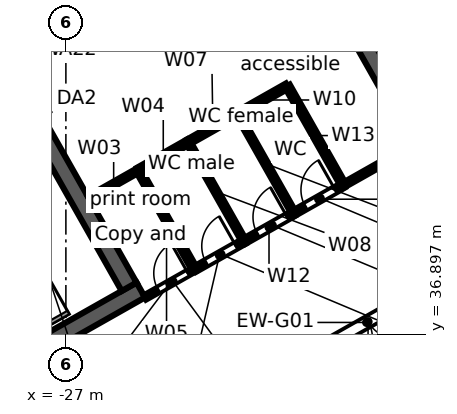
"""IFC4 building model, lengths in metres.
Left out: names, types, materials, properties, quantities, classifications, styles, units other than length and angle.
Written with IfcOpenShell. Run it as: python <this file> out.ifc"""

import sys

from ifc_helpers import new_model, si_unit, direction, frame, frame_2d, origin, place, context, subcontext, project, spatial, rectangle, extrude, element, fill, save


model = new_model("IFC4")
c1 = context("Model", 3, precision=1e-05, world=origin(), true_north=direction((0.0, 1.0)))
c2 = subcontext(c1, "Body", "Model", "MODEL_VIEW")
j1 = project(units=[si_unit("LENGTHUNIT", "METRE"), si_unit("PLANEANGLEUNIT", "RADIAN")], contexts=[c1])
p1 = place(None, origin())
s1 = spatial("IfcSite", under=j1, at=p1, CompositionType="ELEMENT")
p2 = place(p1, origin())
s2 = spatial("IfcBuilding", under=s1, at=p2, CompositionType="ELEMENT")
p3 = place(p2, frame((0.0, 0.0, 250.4)))
s3 = spatial("IfcBuildingStorey", under=s2, at=p3, CompositionType="ELEMENT", Elevation=250.4)
p4 = place(p3, frame((-0.046, 47.974, 0.0), z_axis=(0.0, 0.0, 1.0), x_axis=(-0.870356579543, -0.492421998337, 0.0)))
e1 = element("IfcWall", 1, at=p4, inside=s3, PredefinedType="STANDARD", context=c2, shape_type="SweptSolid", body=[
    extrude(rectangle(XDim=43.754, YDim=0.25, at=frame_2d((21.877, 0.0))), origin(), (0.0, 0.0, 1.0), 3.62),
])
p5 = place(p4, frame((41.061, 0.0, 0.8)))
e2 = element("IfcOpeningElement", 2, at=p5, cuts=e1, PredefinedType="OPENING", context=c2, shape_type="SweptSolid", body=[
    extrude(rectangle(XDim=2.4, YDim=2.2, at=frame_2d((1.2, 1.1))), frame((0.0, 0.135, 0.0), z_axis=(0.0, -1.0, 0.0), x_axis=(1.0, 0.0, 0.0)), (0.0, 0.0, 1.0), 0.27),
])
p6 = place(p4, frame((38.443, 0.0, 0.0)))
e3 = element("IfcOpeningElement", 3, at=p6, cuts=e1, PredefinedType="OPENING", context=c2, shape_type="SweptSolid", body=[
    extrude(rectangle(XDim=1.8, YDim=2.4, at=frame_2d((0.9, 1.2))), frame((0.0, 0.135, 0.0), z_axis=(0.0, -1.0, 0.0), x_axis=(1.0, 0.0, 0.0)), (0.0, 0.0, 1.0), 0.27),
])
p7 = place(p4, frame((35.225, 0.0, 0.8)))
e4 = element("IfcOpeningElement", 4, at=p7, cuts=e1, PredefinedType="OPENING", context=c2, shape_type="SweptSolid", body=[
    extrude(rectangle(XDim=2.4, YDim=2.2, at=frame_2d((1.2, 1.1))), frame((0.0, 0.135, 0.0), z_axis=(0.0, -1.0, 0.0), x_axis=(1.0, 0.0, 0.0)), (0.0, 0.0, 1.0), 0.27),
])
p8 = place(p4, frame((32.307, 0.0, 0.8)))
e5 = element("IfcOpeningElement", 5, at=p8, cuts=e1, PredefinedType="OPENING", context=c2, shape_type="SweptSolid", body=[
    extrude(rectangle(XDim=2.4, YDim=2.2, at=frame_2d((1.2, 1.1))), frame((0.0, 0.135, 0.0), z_axis=(0.0, -1.0, 0.0), x_axis=(1.0, 0.0, 0.0)), (0.0, 0.0, 1.0), 0.27),
])
p9 = place(p4, frame((29.688, 0.0, 0.0)))
e6 = element("IfcOpeningElement", 6, at=p9, cuts=e1, PredefinedType="OPENING", context=c2, shape_type="SweptSolid", body=[
    extrude(rectangle(XDim=1.8, YDim=2.4, at=frame_2d((0.9, 1.2))), frame((0.0, 0.135, 0.0), z_axis=(0.0, -1.0, 0.0), x_axis=(1.0, 0.0, 0.0)), (0.0, 0.0, 1.0), 0.27),
])
p10 = place(p4, frame((26.47, 0.0, 0.8)))
e7 = element("IfcOpeningElement", 7, at=p10, cuts=e1, PredefinedType="OPENING", context=c2, shape_type="SweptSolid", body=[
    extrude(rectangle(XDim=2.4, YDim=2.2, at=frame_2d((1.2, 1.1))), frame((0.0, 0.135, 0.0), z_axis=(0.0, -1.0, 0.0), x_axis=(1.0, 0.0, 0.0)), (0.0, 0.0, 1.0), 0.27),
])
p11 = place(p4, frame((23.552, 0.0, 0.8)))
e8 = element("IfcOpeningElement", 8, at=p11, cuts=e1, PredefinedType="OPENING", context=c2, shape_type="SweptSolid", body=[
    extrude(rectangle(XDim=2.4, YDim=2.2, at=frame_2d((1.2, 1.1))), frame((0.0, 0.135, 0.0), z_axis=(0.0, -1.0, 0.0), x_axis=(1.0, 0.0, 0.0)), (0.0, 0.0, 1.0), 0.27),
])
p12 = place(p4, frame((20.934, 0.0, 0.0)))
e9 = element("IfcOpeningElement", 9, at=p12, cuts=e1, PredefinedType="OPENING", context=c2, shape_type="SweptSolid", body=[
    extrude(rectangle(XDim=1.8, YDim=2.4, at=frame_2d((0.9, 1.2))), frame((0.0, 0.135, 0.0), z_axis=(0.0, -1.0, 0.0), x_axis=(1.0, 0.0, 0.0)), (0.0, 0.0, 1.0), 0.27),
])
p13 = place(p4, frame((17.716, 0.0, 0.8)))
e10 = element("IfcOpeningElement", 10, at=p13, cuts=e1, PredefinedType="OPENING", context=c2, shape_type="SweptSolid", body=[
    extrude(rectangle(XDim=2.4, YDim=2.2, at=frame_2d((1.2, 1.1))), frame((0.0, 0.135, 0.0), z_axis=(0.0, -1.0, 0.0), x_axis=(1.0, 0.0, 0.0)), (0.0, 0.0, 1.0), 0.27),
])
p14 = place(p4, frame((14.798, 0.0, 0.8)))
e11 = element("IfcOpeningElement", 11, at=p14, cuts=e1, PredefinedType="OPENING", context=c2, shape_type="SweptSolid", body=[
    extrude(rectangle(XDim=2.4, YDim=2.2, at=frame_2d((1.2, 1.1))), frame((0.0, 0.135, 0.0), z_axis=(0.0, -1.0, 0.0), x_axis=(1.0, 0.0, 0.0)), (0.0, 0.0, 1.0), 0.27),
])
p15 = place(p4, frame((12.179, 0.0, 0.0)))
e12 = element("IfcOpeningElement", 12, at=p15, cuts=e1, PredefinedType="OPENING", context=c2, shape_type="SweptSolid", body=[
    extrude(rectangle(XDim=1.8, YDim=2.4, at=frame_2d((0.9, 1.2))), frame((0.0, 0.135, 0.0), z_axis=(0.0, -1.0, 0.0), x_axis=(1.0, 0.0, 0.0)), (0.0, 0.0, 1.0), 0.27),
])
p16 = place(p4, frame((8.961, 0.0, 0.8)))
e13 = element("IfcOpeningElement", 13, at=p16, cuts=e1, PredefinedType="OPENING", context=c2, shape_type="SweptSolid", body=[
    extrude(rectangle(XDim=2.4, YDim=2.2, at=frame_2d((1.2, 1.1))), frame((0.0, 0.135, 0.0), z_axis=(0.0, -1.0, 0.0), x_axis=(1.0, 0.0, 0.0)), (0.0, 0.0, 1.0), 0.27),
])
p17 = place(p4, frame((6.043, 0.0, 0.8)))
e14 = element("IfcOpeningElement", 14, at=p17, cuts=e1, PredefinedType="OPENING", context=c2, shape_type="SweptSolid", body=[
    extrude(rectangle(XDim=2.4, YDim=2.2, at=frame_2d((1.2, 1.1))), frame((0.0, 0.135, 0.0), z_axis=(0.0, -1.0, 0.0), x_axis=(1.0, 0.0, 0.0)), (0.0, 0.0, 1.0), 0.27),
])
p18 = place(p4, frame((3.425, 0.0, 0.0)))
e15 = element("IfcOpeningElement", 15, at=p18, cuts=e1, PredefinedType="OPENING", context=c2, shape_type="SweptSolid", body=[
    extrude(rectangle(XDim=1.8, YDim=2.4, at=frame_2d((0.9, 1.2))), frame((0.0, 0.135, 0.0), z_axis=(0.0, -1.0, 0.0), x_axis=(1.0, 0.0, 0.0)), (0.0, 0.0, 1.0), 0.27),
])
p19 = place(p4, frame((0.207, 0.0, 0.8)))
e16 = element("IfcOpeningElement", 16, at=p19, cuts=e1, PredefinedType="OPENING", context=c2, shape_type="SweptSolid", body=[
    extrude(rectangle(XDim=2.4, YDim=2.2, at=frame_2d((1.2, 1.1))), frame((0.0, 0.135, 0.0), z_axis=(0.0, -1.0, 0.0), x_axis=(1.0, 0.0, 0.0)), (0.0, 0.0, 1.0), 0.27),
])
p20 = place(p3, frame((-58.732, 38.771, 0.0), z_axis=(0.0, 0.0, 1.0), x_axis=(0.870354824205, 0.492425100887, 0.0)))
e17 = element("IfcWall", 17, at=p20, inside=s3, PredefinedType="STANDARD", context=c2, shape_type="SweptSolid", body=[
    extrude(rectangle(XDim=64.006, YDim=0.25, at=frame_2d((32.003, 0.0))), origin(), (0.0, 0.0, 1.0), 3.62),
])
p21 = place(p20, frame((61.259, 0.0, 0.8)))
e18 = element("IfcOpeningElement", 18, at=p21, cuts=e17, PredefinedType="OPENING", context=c2, shape_type="SweptSolid", body=[
    extrude(rectangle(XDim=2.4, YDim=2.2, at=frame_2d((1.2, 1.1))), frame((0.0, 0.135, 0.0), z_axis=(0.0, -1.0, 0.0), x_axis=(1.0, 0.0, 0.0)), (0.0, 0.0, 1.0), 0.27),
])
p22 = place(p20, frame((58.216, 0.0, 0.8)))
e19 = element("IfcOpeningElement", 19, at=p22, cuts=e17, PredefinedType="OPENING", context=c2, shape_type="SweptSolid", body=[
    extrude(rectangle(XDim=2.4, YDim=2.2, at=frame_2d((1.2, 1.1))), frame((0.0, 0.135, 0.0), z_axis=(0.0, -1.0, 0.0), x_axis=(1.0, 0.0, 0.0)), (0.0, 0.0, 1.0), 0.27),
])
p23 = place(p20, frame((55.173, 0.0, 0.8)))
e20 = element("IfcOpeningElement", 20, at=p23, cuts=e17, PredefinedType="OPENING", context=c2, shape_type="SweptSolid", body=[
    extrude(rectangle(XDim=2.4, YDim=2.2, at=frame_2d((1.2, 1.1))), frame((0.0, 0.135, 0.0), z_axis=(0.0, -1.0, 0.0), x_axis=(1.0, 0.0, 0.0)), (0.0, 0.0, 1.0), 0.27),
])
p24 = place(p20, frame((52.129, 0.0, 0.8)))
e21 = element("IfcOpeningElement", 21, at=p24, cuts=e17, PredefinedType="OPENING", context=c2, shape_type="SweptSolid", body=[
    extrude(rectangle(XDim=2.4, YDim=2.2, at=frame_2d((1.2, 1.1))), frame((0.0, 0.135, 0.0), z_axis=(0.0, -1.0, 0.0), x_axis=(1.0, 0.0, 0.0)), (0.0, 0.0, 1.0), 0.27),
])
p25 = place(p20, frame((49.086, 0.0, 0.8)))
e22 = element("IfcOpeningElement", 22, at=p25, cuts=e17, PredefinedType="OPENING", context=c2, shape_type="SweptSolid", body=[
    extrude(rectangle(XDim=2.4, YDim=2.2, at=frame_2d((1.2, 1.1))), frame((0.0, 0.135, 0.0), z_axis=(0.0, -1.0, 0.0), x_axis=(1.0, 0.0, 0.0)), (0.0, 0.0, 1.0), 0.27),
])
p26 = place(p20, frame((46.043, 0.0, 0.8)))
e23 = element("IfcOpeningElement", 23, at=p26, cuts=e17, PredefinedType="OPENING", context=c2, shape_type="SweptSolid", body=[
    extrude(rectangle(XDim=2.4, YDim=2.2, at=frame_2d((1.2, 1.1))), frame((0.0, 0.135, 0.0), z_axis=(0.0, -1.0, 0.0), x_axis=(1.0, 0.0, 0.0)), (0.0, 0.0, 1.0), 0.27),
])
p27 = place(p20, frame((43.0, 0.0, 0.8)))
e24 = element("IfcOpeningElement", 24, at=p27, cuts=e17, PredefinedType="OPENING", context=c2, shape_type="SweptSolid", body=[
    extrude(rectangle(XDim=2.4, YDim=2.2, at=frame_2d((1.2, 1.1))), frame((0.0, 0.135, 0.0), z_axis=(0.0, -1.0, 0.0), x_axis=(1.0, 0.0, 0.0)), (0.0, 0.0, 1.0), 0.27),
])
p28 = place(p20, frame((39.956, 0.0, 0.8)))
e25 = element("IfcOpeningElement", 25, at=p28, cuts=e17, PredefinedType="OPENING", context=c2, shape_type="SweptSolid", body=[
    extrude(rectangle(XDim=2.4, YDim=2.2, at=frame_2d((1.2, 1.1))), frame((0.0, 0.135, 0.0), z_axis=(0.0, -1.0, 0.0), x_axis=(1.0, 0.0, 0.0)), (0.0, 0.0, 1.0), 0.27),
])
p29 = place(p20, frame((36.913, 0.0, 0.8)))
e26 = element("IfcOpeningElement", 26, at=p29, cuts=e17, PredefinedType="OPENING", context=c2, shape_type="SweptSolid", body=[
    extrude(rectangle(XDim=2.4, YDim=2.2, at=frame_2d((1.2, 1.1))), frame((0.0, 0.135, 0.0), z_axis=(0.0, -1.0, 0.0), x_axis=(1.0, 0.0, 0.0)), (0.0, 0.0, 1.0), 0.27),
])
p30 = place(p20, frame((33.87, 0.0, 0.8)))
e27 = element("IfcOpeningElement", 27, at=p30, cuts=e17, PredefinedType="OPENING", context=c2, shape_type="SweptSolid", body=[
    extrude(rectangle(XDim=2.4, YDim=2.2, at=frame_2d((1.2, 1.1))), frame((0.0, 0.135, 0.0), z_axis=(0.0, -1.0, 0.0), x_axis=(1.0, 0.0, 0.0)), (0.0, 0.0, 1.0), 0.27),
])
p31 = place(p20, frame((30.826, 0.0, 0.8)))
e28 = element("IfcOpeningElement", 28, at=p31, cuts=e17, PredefinedType="OPENING", context=c2, shape_type="SweptSolid", body=[
    extrude(rectangle(XDim=2.4, YDim=2.2, at=frame_2d((1.2, 1.1))), frame((0.0, 0.135, 0.0), z_axis=(0.0, -1.0, 0.0), x_axis=(1.0, 0.0, 0.0)), (0.0, 0.0, 1.0), 0.27),
])
p32 = place(p20, frame((27.783, 0.0, 0.8)))
e29 = element("IfcOpeningElement", 29, at=p32, cuts=e17, PredefinedType="OPENING", context=c2, shape_type="SweptSolid", body=[
    extrude(rectangle(XDim=2.4, YDim=2.2, at=frame_2d((1.2, 1.1))), frame((0.0, 0.135, 0.0), z_axis=(0.0, -1.0, 0.0), x_axis=(1.0, 0.0, 0.0)), (0.0, 0.0, 1.0), 0.27),
])
p33 = place(p20, frame((24.74, 0.0, 0.8)))
e30 = element("IfcOpeningElement", 30, at=p33, cuts=e17, PredefinedType="OPENING", context=c2, shape_type="SweptSolid", body=[
    extrude(rectangle(XDim=2.4, YDim=2.2, at=frame_2d((1.2, 1.1))), frame((0.0, 0.135, 0.0), z_axis=(0.0, -1.0, 0.0), x_axis=(1.0, 0.0, 0.0)), (0.0, 0.0, 1.0), 0.27),
])
p34 = place(p20, frame((21.696, 0.0, 0.8)))
e31 = element("IfcOpeningElement", 31, at=p34, cuts=e17, PredefinedType="OPENING", context=c2, shape_type="SweptSolid", body=[
    extrude(rectangle(XDim=2.4, YDim=2.2, at=frame_2d((1.2, 1.1))), frame((0.0, 0.135, 0.0), z_axis=(0.0, -1.0, 0.0), x_axis=(1.0, 0.0, 0.0)), (0.0, 0.0, 1.0), 0.27),
])
p35 = place(p20, frame((18.653, 0.0, 0.8)))
e32 = element("IfcOpeningElement", 32, at=p35, cuts=e17, PredefinedType="OPENING", context=c2, shape_type="SweptSolid", body=[
    extrude(rectangle(XDim=2.4, YDim=2.2, at=frame_2d((1.2, 1.1))), frame((0.0, 0.135, 0.0), z_axis=(0.0, -1.0, 0.0), x_axis=(1.0, 0.0, 0.0)), (0.0, 0.0, 1.0), 0.27),
])
p36 = place(p20, frame((15.61, 0.0, 0.8)))
e33 = element("IfcOpeningElement", 33, at=p36, cuts=e17, PredefinedType="OPENING", context=c2, shape_type="SweptSolid", body=[
    extrude(rectangle(XDim=2.4, YDim=2.2, at=frame_2d((1.2, 1.1))), frame((0.0, 0.135, 0.0), z_axis=(0.0, -1.0, 0.0), x_axis=(1.0, 0.0, 0.0)), (0.0, 0.0, 1.0), 0.27),
])
p37 = place(p20, frame((12.567, 0.0, 0.8)))
e34 = element("IfcOpeningElement", 34, at=p37, cuts=e17, PredefinedType="OPENING", context=c2, shape_type="SweptSolid", body=[
    extrude(rectangle(XDim=2.4, YDim=2.2, at=frame_2d((1.2, 1.1))), frame((0.0, 0.135, 0.0), z_axis=(0.0, -1.0, 0.0), x_axis=(1.0, 0.0, 0.0)), (0.0, 0.0, 1.0), 0.27),
])
p38 = place(p20, frame((9.523, 0.0, 0.8)))
e35 = element("IfcOpeningElement", 35, at=p38, cuts=e17, PredefinedType="OPENING", context=c2, shape_type="SweptSolid", body=[
    extrude(rectangle(XDim=2.4, YDim=2.2, at=frame_2d((1.2, 1.1))), frame((0.0, 0.135, 0.0), z_axis=(0.0, -1.0, 0.0), x_axis=(1.0, 0.0, 0.0)), (0.0, 0.0, 1.0), 0.27),
])
p39 = place(p20, frame((6.48, 0.0, 0.8)))
e36 = element("IfcOpeningElement", 36, at=p39, cuts=e17, PredefinedType="OPENING", context=c2, shape_type="SweptSolid", body=[
    extrude(rectangle(XDim=2.4, YDim=2.2, at=frame_2d((1.2, 1.1))), frame((0.0, 0.135, 0.0), z_axis=(0.0, -1.0, 0.0), x_axis=(1.0, 0.0, 0.0)), (0.0, 0.0, 1.0), 0.27),
])
p40 = place(p20, frame((3.437, 0.0, 0.8)))
e37 = element("IfcOpeningElement", 37, at=p40, cuts=e17, PredefinedType="OPENING", context=c2, shape_type="SweptSolid", body=[
    extrude(rectangle(XDim=2.4, YDim=2.2, at=frame_2d((1.2, 1.1))), frame((0.0, 0.135, 0.0), z_axis=(0.0, -1.0, 0.0), x_axis=(1.0, 0.0, 0.0)), (0.0, 0.0, 1.0), 0.27),
])
p41 = place(p20, frame((0.393, 0.0, 0.8)))
e38 = element("IfcOpeningElement", 38, at=p41, cuts=e17, PredefinedType="OPENING", context=c2, shape_type="SweptSolid", body=[
    extrude(rectangle(XDim=2.4, YDim=2.2, at=frame_2d((1.2, 1.1))), frame((0.0, 0.135, 0.0), z_axis=(0.0, -1.0, 0.0), x_axis=(1.0, 0.0, 0.0)), (0.0, 0.0, 1.0), 0.27),
])
p42 = place(p3, frame((-39.825, 29.684, 0.0), z_axis=(0.0, 0.0, 1.0), x_axis=(0.870353598469, 0.492427267353, 0.0)))
e39 = element("IfcWall", 39, at=p42, inside=s3, PredefinedType="SOLIDWALL", context=c2, shape_type="SweptSolid", body=[
    extrude(rectangle(XDim=17.0, YDim=0.45, at=frame_2d((8.5, 0.0))), origin(), (0.0, 0.0, 1.0), 3.62),
])
p43 = place(p42, frame((7.2, 0.0, 0.0)))
e40 = element("IfcOpeningElement", 40, at=p43, cuts=e39, PredefinedType="OPENING", context=c2, shape_type="SweptSolid", body=[
    extrude(rectangle(XDim=1.2, YDim=2.1, at=frame_2d((0.6, 1.05))), frame((0.0, 0.235, 0.0), z_axis=(0.0, -1.0, 0.0), x_axis=(1.0, 0.0, 0.0)), (0.0, 0.0, 1.0), 0.47),
])
p44 = place(p3, frame((-31.787, 49.542, 0.0), z_axis=(0.0, 0.0, 1.0), x_axis=(0.492421378713, -0.870356930107, 0.0)))
e41 = element("IfcWall", 41, at=p44, inside=s3, PredefinedType="SOLIDWALL", context=c2, shape_type="SweptSolid", body=[
    extrude(rectangle(XDim=13.1, YDim=0.45, at=frame_2d((6.55, 0.0))), origin(), (0.0, 0.0, 1.0), 3.62),
])
p45 = place(p3, frame((-24.353, 53.747, 0.0), z_axis=(0.0, 0.0, 1.0), x_axis=(0.492435496286, -0.870348942665, 0.0)))
e42 = element("IfcWall", 42, at=p45, inside=s3, PredefinedType="SOLIDWALL", context=c2, shape_type="SweptSolid", body=[
    extrude(rectangle(XDim=13.1, YDim=0.45, at=frame_2d((6.55, 0.0))), origin(), (0.0, 0.0, 1.0), 3.62),
])
p46 = place(p3, frame((-26.396, 40.47, 0.0), z_axis=(0.0, 0.0, 1.0), x_axis=(0.870308175411, 0.492507542899, 0.0)))
e43 = element("IfcWall", 43, at=p46, inside=s3, PredefinedType="PARTITIONING", context=c2, shape_type="SweptSolid", body=[
    extrude(rectangle(XDim=1.5, YDim=0.125, at=frame_2d((0.75, 0.0))), origin(), (0.0, 0.0, 1.0), 2.892),
])
p47 = place(p3, frame((-25.09, 41.209, 0.0), z_axis=(0.0, 0.0, 1.0), x_axis=(0.870468812868, 0.492223573008, 0.0)))
e44 = element("IfcWall", 44, at=p47, inside=s3, PredefinedType="PARTITIONING", context=c2, shape_type="SweptSolid", body=[
    extrude(rectangle(XDim=1.5, YDim=0.15, at=frame_2d((0.75, 0.0))), origin(), (0.0, 0.0, 1.0), 3.62),
])
p48 = place(p3, frame((-25.09, 41.209, 0.0), z_axis=(0.0, 0.0, 1.0), x_axis=(0.492365617434, -0.870388475779, 0.0)))
e45 = element("IfcWall", 45, at=p48, inside=s3, PredefinedType="PARTITIONING", context=c2, shape_type="SweptSolid", body=[
    extrude(rectangle(XDim=3.0, YDim=0.15, at=frame_2d((1.5, 0.0))), origin(), (0.0, 0.0, 1.0), 3.62),
])
p49 = place(p3, frame((-24.919, 37.859, 0.0), z_axis=(0.0, 0.0, 1.0), x_axis=(0.870308175411, 0.492507542899, 0.0)))
e46 = element("IfcWall", 46, at=p49, inside=s3, PredefinedType="PARTITIONING", context=c2, shape_type="SweptSolid", body=[
    extrude(rectangle(XDim=1.5, YDim=0.125, at=frame_2d((0.75, 0.0))), origin(), (0.0, 0.0, 1.0), 2.892),
])
p50 = place(p49, frame((0.4, 0.0, 0.0)))
e47 = element("IfcOpeningElement", 47, at=p50, cuts=e46, PredefinedType="OPENING", context=c2, shape_type="SweptSolid", body=[
    extrude(rectangle(XDim=0.9, YDim=2.1, at=frame_2d((0.45, 1.05))), frame((0.0, 0.073, 0.0), z_axis=(0.0, -1.0, 0.0), x_axis=(1.0, 0.0, 0.0)), (0.0, 0.0, 1.0), 0.145),
])
p51 = place(p3, frame((-23.785, 41.947, 0.0), z_axis=(0.0, 0.0, 1.0), x_axis=(0.870308175411, 0.492507542899, 0.0)))
e48 = element("IfcWall", 48, at=p51, inside=s3, PredefinedType="PARTITIONING", context=c2, shape_type="SweptSolid", body=[
    extrude(rectangle(XDim=1.5, YDim=0.15, at=frame_2d((0.75, 0.0))), origin(), (0.0, 0.0, 1.0), 3.62),
])
p52 = place(p3, frame((-23.785, 41.947, 0.0), z_axis=(0.0, 0.0, 1.0), x_axis=(0.492303960105, -0.870423351516, 0.0)))
e49 = element("IfcWall", 49, at=p52, inside=s3, PredefinedType="PARTITIONING", context=c2, shape_type="SweptSolid", body=[
    extrude(rectangle(XDim=3.0, YDim=0.125, at=frame_2d((1.5, 0.0))), origin(), (0.0, 0.0, 1.0), 3.62),
])
p53 = place(p3, frame((-23.613, 38.598, 0.0), z_axis=(0.0, 0.0, 1.0), x_axis=(0.870429354291, 0.492293346683, 0.0)))
e50 = element("IfcWall", 50, at=p53, inside=s3, PredefinedType="PARTITIONING", context=c2, shape_type="SweptSolid", body=[
    extrude(rectangle(XDim=1.499, YDim=0.15, at=frame_2d((0.75, 0.0))), origin(), (0.0, 0.0, 1.0), 3.62),
])
p54 = place(p53, frame((0.35, 0.0, 0.0)))
e51 = element("IfcOpeningElement", 51, at=p54, cuts=e50, PredefinedType="OPENING", context=c2, shape_type="SweptSolid", body=[
    extrude(rectangle(XDim=0.9, YDim=2.1, at=frame_2d((0.45, 1.05))), frame((0.0, 0.085, 0.0), z_axis=(0.0, -1.0, 0.0), x_axis=(1.0, 0.0, 0.0)), (0.0, 0.0, 1.0), 0.17),
])
p55 = place(p3, frame((-22.479, 42.686, 0.0), z_axis=(0.0, 0.0, 1.0), x_axis=(0.870150176056, 0.492786638526, 0.0)))
e52 = element("IfcWall", 52, at=p55, inside=s3, PredefinedType="PARTITIONING", context=c2, shape_type="SweptSolid", body=[
    extrude(rectangle(XDim=1.5, YDim=0.15, at=frame_2d((0.75, 0.0))), origin(), (0.0, 0.0, 1.0), 3.62),
])
p56 = place(p3, frame((-22.479, 42.686, 0.0), z_axis=(0.0, 0.0, 1.0), x_axis=(0.492365617434, -0.870388475779, 0.0)))
e53 = element("IfcWall", 53, at=p56, inside=s3, PredefinedType="PARTITIONING", context=c2, shape_type="SweptSolid", body=[
    extrude(rectangle(XDim=3.0, YDim=0.125, at=frame_2d((1.5, 0.0))), origin(), (0.0, 0.0, 1.0), 3.62),
])
p57 = place(p3, frame((-22.308, 39.336, 0.0), z_axis=(0.0, 0.0, 1.0), x_axis=(0.870347633314, 0.492437810475, 0.0)))
e54 = element("IfcWall", 54, at=p57, inside=s3, PredefinedType="PARTITIONING", context=c2, shape_type="SweptSolid", body=[
    extrude(rectangle(XDim=1.501, YDim=0.15, at=frame_2d((0.75, 0.0))), origin(), (0.0, 0.0, 1.0), 3.62),
])
p58 = place(p57, frame((0.4, 0.0, 0.0)))
e55 = element("IfcOpeningElement", 55, at=p58, cuts=e54, PredefinedType="OPENING", context=c2, shape_type="SweptSolid", body=[
    extrude(rectangle(XDim=0.9, YDim=2.1, at=frame_2d((0.45, 1.05))), frame((0.0, 0.085, 0.0), z_axis=(0.0, -1.0, 0.0), x_axis=(1.0, 0.0, 0.0)), (0.0, 0.0, 1.0), 0.17),
])
p59 = place(p3, frame((-21.174, 43.425, 0.0), z_axis=(0.0, 0.0, 1.0), x_axis=(0.492365617434, -0.870388475779, 0.0)))
e56 = element("IfcWall", 56, at=p59, inside=s3, PredefinedType="PARTITIONING", context=c2, shape_type="SweptSolid", body=[
    extrude(rectangle(XDim=3.0, YDim=0.15, at=frame_2d((1.5, 0.0))), origin(), (0.0, 0.0, 1.0), 3.62),
])
p60 = place(p3, frame((-21.002, 40.075, 0.0), z_axis=(0.0, 0.0, 1.0), x_axis=(0.870150176056, 0.492786638526, 0.0)))
e57 = element("IfcWall", 57, at=p60, inside=s3, PredefinedType="PARTITIONING", context=c2, shape_type="SweptSolid", body=[
    extrude(rectangle(XDim=1.5, YDim=0.15, at=frame_2d((0.75, 0.0))), origin(), (0.0, 0.0, 1.0), 3.62),
])
p61 = place(p60, frame((0.35, 0.0, 0.0)))
e58 = element("IfcOpeningElement", 58, at=p61, cuts=e57, PredefinedType="OPENING", context=c2, shape_type="SweptSolid", body=[
    extrude(rectangle(XDim=0.9, YDim=2.1, at=frame_2d((0.45, 1.05))), frame((0.0, 0.085, 0.0), z_axis=(0.0, -1.0, 0.0), x_axis=(1.0, 0.0, 0.0)), (0.0, 0.0, 1.0), 0.17),
])
p62 = place(p3, frame((-19.697, 40.814, 0.0), z_axis=(0.0, 0.0, 1.0), x_axis=(0.870497588791, 0.492172680986, 0.0)))
e59 = element("IfcWall", 59, at=p62, inside=s3, PredefinedType="PARTITIONING", context=c2, shape_type="SweptSolid", body=[
    extrude(rectangle(XDim=2.091, YDim=0.125, at=frame_2d((1.045, 0.0))), origin(), (0.0, 0.0, 1.0), 3.62),
])
p63 = place(p12, origin())
e60 = element("IfcDoor", 60, at=p63, inside=s3, OperationType="DOUBLE_DOOR_SINGLE_SWING", PredefinedType="DOOR", context=c2, shape_type="SweptSolid", body=[
    extrude(rectangle(XDim=1.8, YDim=2.4, at=frame_2d((0.9, 1.2))), frame((0.0, 0.025, 0.0), z_axis=(0.0, -1.0, 0.0), x_axis=(1.0, 0.0, 0.0)), (0.0, 0.0, 1.0), 0.05),
])
fill(e9, e60)
p64 = place(p50, origin())
e61 = element("IfcDoor", 61, at=p64, inside=s3, OperationType="SINGLE_SWING_RIGHT", PredefinedType="DOOR", context=c2, shape_type="SweptSolid", body=[
    extrude(rectangle(XDim=0.9, YDim=2.1, at=frame_2d((0.45, 1.05))), frame((0.0, 0.025, 0.0), z_axis=(0.0, -1.0, 0.0), x_axis=(1.0, 0.0, 0.0)), (0.0, 0.0, 1.0), 0.05),
])
fill(e47, e61)
p65 = place(p54, origin())
e62 = element("IfcDoor", 62, at=p65, inside=s3, OperationType="SINGLE_SWING_RIGHT", PredefinedType="DOOR", context=c2, shape_type="SweptSolid", body=[
    extrude(rectangle(XDim=0.9, YDim=2.1, at=frame_2d((0.45, 1.05))), frame((0.0, 0.025, 0.0), z_axis=(0.0, -1.0, 0.0), x_axis=(1.0, 0.0, 0.0)), (0.0, 0.0, 1.0), 0.05),
])
fill(e51, e62)
p66 = place(p58, origin())
e63 = element("IfcDoor", 63, at=p66, inside=s3, OperationType="SINGLE_SWING_RIGHT", PredefinedType="DOOR", context=c2, shape_type="SweptSolid", body=[
    extrude(rectangle(XDim=0.9, YDim=2.1, at=frame_2d((0.45, 1.05))), frame((0.0, 0.025, 0.0), z_axis=(0.0, -1.0, 0.0), x_axis=(1.0, 0.0, 0.0)), (0.0, 0.0, 1.0), 0.05),
])
fill(e55, e63)
p67 = place(p61, origin())
e64 = element("IfcDoor", 64, at=p67, inside=s3, OperationType="SINGLE_SWING_RIGHT", PredefinedType="DOOR", context=c2, shape_type="SweptSolid", body=[
    extrude(rectangle(XDim=0.9, YDim=2.1, at=frame_2d((0.45, 1.05))), frame((0.0, 0.025, 0.0), z_axis=(0.0, -1.0, 0.0), x_axis=(1.0, 0.0, 0.0)), (0.0, 0.0, 1.0), 0.05),
])
fill(e58, e64)
save(model, sys.argv[1])
